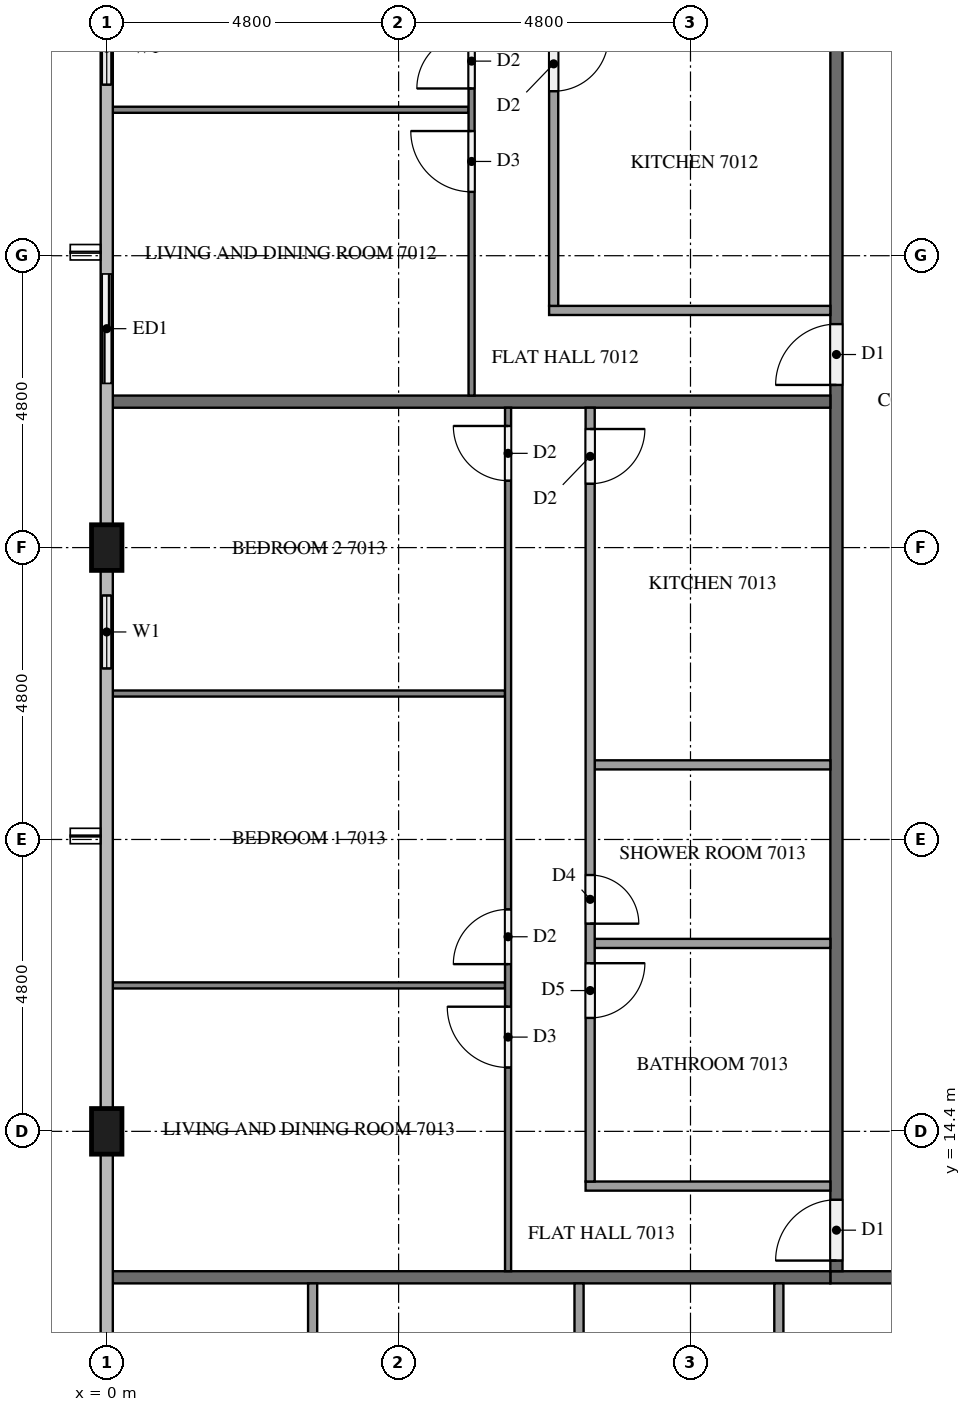
"""IFC4 building model, lengths in metres.
Left out: names, types, materials, properties, quantities, classifications, styles, units other than length and angle.
Written with IfcOpenShell. Run it as: python <this file> out.ifc"""

import sys

from ifc_helpers import new_model, si_unit, direction, frame, frame_2d, origin, origin_2d, place, context, subcontext, project, spatial, rectangle, extrude, element, fill, save


model = new_model("IFC4")
c1 = context("Model", 3, precision=1e-05, world=origin(), true_north=direction((0.0, 1.0)))
c2 = subcontext(c1, "Body", "Model", "MODEL_VIEW")
j1 = project(units=[si_unit("LENGTHUNIT", "METRE"), si_unit("PLANEANGLEUNIT", "RADIAN")], contexts=[c1])
p1 = place(None, origin())
s1 = spatial("IfcSite", under=j1, at=p1, CompositionType="ELEMENT")
p2 = place(p1, origin())
s2 = spatial("IfcBuilding", under=s1, at=p2, CompositionType="ELEMENT")
p3 = place(p2, frame((0.0, 0.0, 268.6)))
s3 = spatial("IfcBuildingStorey", under=s2, at=p3, CompositionType="ELEMENT", Elevation=268.6)
for number, where, z_axis, x_axis in (
    (1, (0.0, 24.0, 0.0), (0.0, 0.0, 1.0), (0.0, 1.0, 0.0)),
    (2, (0.0, 14.4, 0.0), (0.0, 0.0, 1.0), (0.0, 1.0, 0.0)),
):
    element("IfcColumn", number, at=place(p3, frame(where, z_axis=z_axis, x_axis=x_axis)), inside=s3, PredefinedType="COLUMN", context=c2, shape_type="SweptSolid", body=[
        extrude(rectangle(XDim=0.75, YDim=0.5, at=origin_2d()), origin(), (0.0, 0.0, 1.0), 3.2),
    ])
p4 = place(p3, frame((0.0, 33.225, 0.0), z_axis=(0.0, 0.0, 1.0), x_axis=(0.0, -1.0, 0.0)))
e3 = element("IfcWall", 3, at=p4, inside=s3, PredefinedType="SOLIDWALL", context=c2, shape_type="SweptSolid", body=[
    extrude(rectangle(XDim=2.025, YDim=0.15, at=frame_2d((1.013, 0.0))), origin(), (0.0, 0.0, 1.0), 3.2),
])
p5 = place(p4, frame((0.413, 0.0, 0.9)))
e4 = element("IfcOpeningElement", 4, at=p5, cuts=e3, PredefinedType="OPENING", context=c2, shape_type="SweptSolid", body=[
    extrude(rectangle(XDim=1.2, YDim=1.4, at=frame_2d((0.6, 0.7))), frame((0.0, 0.085, 0.0), z_axis=(0.0, -1.0, 0.0), x_axis=(1.0, 0.0, 0.0)), (0.0, 0.0, 1.0), 0.17),
])
p6 = place(p3, frame((0.0, 28.8, 0.0), z_axis=(0.0, 0.0, 1.0), x_axis=(0.0, -1.0, 0.0)))
e5 = element("IfcWall", 5, at=p6, inside=s3, PredefinedType="SOLIDWALL", context=c2, shape_type="SweptSolid", body=[
    extrude(rectangle(XDim=2.4, YDim=0.15, at=frame_2d((1.2, 0.0))), origin(), (0.0, 0.0, 1.0), 3.2),
])
p7 = place(p6, frame((0.3, 0.0, 0.0)))
e6 = element("IfcOpeningElement", 6, at=p7, cuts=e5, PredefinedType="OPENING", context=c2, shape_type="SweptSolid", body=[
    extrude(rectangle(XDim=1.8, YDim=2.4, at=frame_2d((0.9, 1.2))), frame((0.0, 0.085, 0.0), z_axis=(0.0, -1.0, 0.0), x_axis=(1.0, 0.0, 0.0)), (0.0, 0.0, 1.0), 0.17),
])
p8 = place(p3, frame((0.0, 23.625, 0.0), z_axis=(0.0, 0.0, 1.0), x_axis=(0.0, -1.0, 0.0)))
e7 = element("IfcWall", 7, at=p8, inside=s3, PredefinedType="SOLIDWALL", context=c2, shape_type="SweptSolid", body=[
    extrude(rectangle(XDim=2.025, YDim=0.15, at=frame_2d((1.012, 0.0))), origin(), (0.0, 0.0, 1.0), 3.2),
])
p9 = place(p8, frame((0.413, 0.0, 0.9)))
e8 = element("IfcOpeningElement", 8, at=p9, cuts=e7, PredefinedType="OPENING", context=c2, shape_type="SweptSolid", body=[
    extrude(rectangle(XDim=1.2, YDim=1.4, at=frame_2d((0.6, 0.7))), frame((0.0, 0.085, 0.0), z_axis=(0.0, -1.0, 0.0), x_axis=(1.0, 0.0, 0.0)), (0.0, 0.0, 1.0), 0.17),
])
p10 = place(p3, frame((50.5, 12.0, 0.0), z_axis=(0.0, 0.0, 1.0), x_axis=(-1.0, 0.0, 0.0)))
e9 = element("IfcWall", 9, at=p10, inside=s3, PredefinedType="PARTITIONING", context=c2, shape_type="SweptSolid", body=[
    extrude(rectangle(XDim=38.6, YDim=0.2, at=frame_2d((19.3, 0.0))), origin(), (0.0, 0.0, 1.0), 3.2),
])
p11 = place(p10, frame((31.525, 0.0, 0.0)))
e10 = element("IfcOpeningElement", 10, at=p11, cuts=e9, PredefinedType="OPENING", context=c2, shape_type="SweptSolid", body=[
    extrude(rectangle(XDim=1.1, YDim=2.1, at=frame_2d((0.55, 1.05))), frame((0.0, 0.11, 0.0), z_axis=(0.0, -1.0, 0.0), x_axis=(1.0, 0.0, 0.0)), (0.0, 0.0, 1.0), 0.22),
])
p12 = place(p10, frame((19.575, 0.0, 0.0)))
e11 = element("IfcOpeningElement", 11, at=p12, cuts=e9, PredefinedType="OPENING", context=c2, shape_type="SweptSolid", body=[
    extrude(rectangle(XDim=1.0, YDim=2.1, at=frame_2d((0.5, 1.05))), frame((0.0, 0.11, 0.0), z_axis=(0.0, -1.0, 0.0), x_axis=(1.0, 0.0, 0.0)), (0.0, 0.0, 1.0), 0.22),
])
p13 = place(p10, frame((18.025, 0.0, 0.0)))
e12 = element("IfcOpeningElement", 12, at=p13, cuts=e9, PredefinedType="OPENING", context=c2, shape_type="SweptSolid", body=[
    extrude(rectangle(XDim=1.0, YDim=2.1, at=frame_2d((0.5, 1.05))), frame((0.0, 0.11, 0.0), z_axis=(0.0, -1.0, 0.0), x_axis=(1.0, 0.0, 0.0)), (0.0, 0.0, 1.0), 0.22),
])
p14 = place(p10, frame((1.225, 0.0, 0.0)))
e13 = element("IfcOpeningElement", 13, at=p14, cuts=e9, PredefinedType="OPENING", context=c2, shape_type="SweptSolid", body=[
    extrude(rectangle(XDim=1.0, YDim=2.1, at=frame_2d((0.5, 1.05))), frame((0.0, 0.11, 0.0), z_axis=(0.0, -1.0, 0.0), x_axis=(1.0, 0.0, 0.0)), (0.0, 0.0, 1.0), 0.22),
])
p15 = place(p3, frame((12.0, 12.1, 0.0), z_axis=(0.0, 0.0, 1.0), x_axis=(0.0, 1.0, 0.0)))
e14 = element("IfcWall", 14, at=p15, inside=s3, PredefinedType="PARTITIONING", context=c2, shape_type="SweptSolid", body=[
    extrude(rectangle(XDim=28.6, YDim=0.2, at=frame_2d((14.3, 0.0))), origin(), (0.0, 0.0, 1.0), 3.2),
])
p16 = place(p15, frame((24.175, 0.0, 0.0)))
e15 = element("IfcOpeningElement", 15, at=p16, cuts=e14, PredefinedType="OPENING", context=c2, shape_type="SweptSolid", body=[
    extrude(rectangle(XDim=1.0, YDim=2.1, at=frame_2d((0.5, 1.05))), frame((0.0, 0.11, 0.0), z_axis=(0.0, -1.0, 0.0), x_axis=(1.0, 0.0, 0.0)), (0.0, 0.0, 1.0), 0.22),
])
p17 = place(p15, frame((14.575, 0.0, 0.0)))
e16 = element("IfcOpeningElement", 16, at=p17, cuts=e14, PredefinedType="OPENING", context=c2, shape_type="SweptSolid", body=[
    extrude(rectangle(XDim=1.0, YDim=2.1, at=frame_2d((0.5, 1.05))), frame((0.0, 0.11, 0.0), z_axis=(0.0, -1.0, 0.0), x_axis=(1.0, 0.0, 0.0)), (0.0, 0.0, 1.0), 0.22),
])
p18 = place(p15, frame((0.175, 0.0, 0.0)))
e17 = element("IfcOpeningElement", 17, at=p18, cuts=e14, PredefinedType="OPENING", context=c2, shape_type="SweptSolid", body=[
    extrude(rectangle(XDim=1.0, YDim=2.1, at=frame_2d((0.5, 1.05))), frame((0.0, 0.11, 0.0), z_axis=(0.0, -1.0, 0.0), x_axis=(1.0, 0.0, 0.0)), (0.0, 0.0, 1.0), 0.22),
])
for number, where, z_axis, x_axis in (
    (18, (0.1, 12.0, 0.0), (0.0, 0.0, 1.0), (1.0, 0.0, 0.0)),
    (19, (0.1, 26.4, 0.0), (0.0, 0.0, 1.0), (1.0, 0.0, 0.0)),
):
    element("IfcWall", number, at=place(p3, frame(where, z_axis=z_axis, x_axis=x_axis)), inside=s3, PredefinedType="PARTITIONING", context=c2, shape_type="SweptSolid", body=[
        extrude(rectangle(XDim=11.8, YDim=0.2, at=frame_2d((5.9, 0.0))), origin(), (0.0, 0.0, 1.0), 3.2),
    ])
for number, where, z_axis, x_axis in (
    (20, (11.053, 11.9, 0.0), (0.0, 0.0, 1.0), (0.0, -1.0, 0.0)),
    (21, (7.767, 11.9, 0.0), (0.0, 0.0, 1.0), (0.0, -1.0, 0.0)),
    (22, (3.386, 11.9, 0.0), (0.0, 0.0, 1.0), (0.0, -1.0, 0.0)),
):
    element("IfcWall", number, at=place(p3, frame(where, z_axis=z_axis, x_axis=x_axis)), inside=s3, PredefinedType="PARTITIONING", context=c2, shape_type="SweptSolid", body=[
        extrude(rectangle(XDim=2.975, YDim=0.15, at=frame_2d((1.487, 0.0))), origin(), (0.0, 0.0, 1.0), 3.2),
    ])
p19 = place(p3, frame((5.95, 31.2, 0.0), z_axis=(0.0, 0.0, 1.0), x_axis=(-1.0, 0.0, 0.0)))
e23 = element("IfcWall", 23, at=p19, inside=s3, PredefinedType="PARTITIONING", context=c2, shape_type="SweptSolid", body=[
    extrude(rectangle(XDim=5.85, YDim=0.1, at=frame_2d((2.925, 0.0))), origin(), (0.0, 0.0, 1.0), 3.2),
])
p20 = place(p3, frame((6.0, 26.5, 0.0), z_axis=(0.0, 0.0, 1.0), x_axis=(0.0, 1.0, 0.0)))
e24 = element("IfcWall", 24, at=p20, inside=s3, PredefinedType="PARTITIONING", context=c2, shape_type="SweptSolid", body=[
    extrude(rectangle(XDim=9.4, YDim=0.1, at=frame_2d((4.7, 0.0))), origin(), (0.0, 0.0, 1.0), 3.2),
])
p21 = place(p20, frame((3.35, 0.0, 0.0)))
e25 = element("IfcOpeningElement", 25, at=p21, cuts=e24, PredefinedType="OPENING", context=c2, shape_type="SweptSolid", body=[
    extrude(rectangle(XDim=1.0, YDim=2.1, at=frame_2d((0.5, 1.05))), frame((0.0, 0.06, 0.0), z_axis=(0.0, -1.0, 0.0), x_axis=(1.0, 0.0, 0.0)), (0.0, 0.0, 1.0), 0.12),
])
p22 = place(p20, frame((5.05, 0.0, 0.0)))
e26 = element("IfcOpeningElement", 26, at=p22, cuts=e24, PredefinedType="OPENING", context=c2, shape_type="SweptSolid", body=[
    extrude(rectangle(XDim=0.9, YDim=2.1, at=frame_2d((0.45, 1.05))), frame((0.0, 0.06, 0.0), z_axis=(0.0, -1.0, 0.0), x_axis=(1.0, 0.0, 0.0)), (0.0, 0.0, 1.0), 0.12),
])
p23 = place(p3, frame((11.9, 27.9, 0.0), z_axis=(0.0, 0.0, 1.0), x_axis=(-1.0, 0.0, 0.0)))
e27 = element("IfcWall", 27, at=p23, inside=s3, PredefinedType="PARTITIONING", context=c2, shape_type="SweptSolid", body=[
    extrude(rectangle(XDim=4.625, YDim=0.15, at=frame_2d((2.312, 0.0))), origin(), (0.0, 0.0, 1.0), 3.2),
])
p24 = place(p3, frame((7.35, 35.9, 0.0), z_axis=(0.0, 0.0, 1.0), x_axis=(0.0, -1.0, 0.0)))
e28 = element("IfcWall", 28, at=p24, inside=s3, PredefinedType="PARTITIONING", context=c2, shape_type="SweptSolid", body=[
    extrude(rectangle(XDim=7.925, YDim=0.15, at=frame_2d((3.962, 0.0))), origin(), (0.0, 0.0, 1.0), 3.2),
])
p25 = place(p24, frame((3.495, 0.0, 0.0)))
e29 = element("IfcOpeningElement", 29, at=p25, cuts=e28, PredefinedType="OPENING", context=c2, shape_type="SweptSolid", body=[
    extrude(rectangle(XDim=0.9, YDim=2.1, at=frame_2d((0.45, 1.05))), frame((0.0, 0.085, 0.0), z_axis=(0.0, -1.0, 0.0), x_axis=(1.0, 0.0, 0.0)), (0.0, 0.0, 1.0), 0.17),
])
p26 = place(p24, frame((2.045, 0.0, 0.0)))
e30 = element("IfcOpeningElement", 30, at=p26, cuts=e28, PredefinedType="OPENING", context=c2, shape_type="SweptSolid", body=[
    extrude(rectangle(XDim=0.8, YDim=2.1, at=frame_2d((0.4, 1.05))), frame((0.0, 0.085, 0.0), z_axis=(0.0, -1.0, 0.0), x_axis=(1.0, 0.0, 0.0)), (0.0, 0.0, 1.0), 0.17),
])
for number, where, z_axis, x_axis in (
    (31, (6.55, 16.8, 0.0), (0.0, 0.0, 1.0), (-1.0, 0.0, 0.0)),
    (32, (6.55, 21.6, 0.0), (0.0, 0.0, 1.0), (-1.0, 0.0, 0.0)),
):
    element("IfcWall", number, at=place(p3, frame(where, z_axis=z_axis, x_axis=x_axis)), inside=s3, PredefinedType="PARTITIONING", context=c2, shape_type="SweptSolid", body=[
        extrude(rectangle(XDim=6.45, YDim=0.1, at=frame_2d((3.225, 0.0))), origin(), (0.0, 0.0, 1.0), 3.2),
    ])
p27 = place(p3, frame((6.6, 12.1, 0.0), z_axis=(0.0, 0.0, 1.0), x_axis=(0.0, 1.0, 0.0)))
e33 = element("IfcWall", 33, at=p27, inside=s3, PredefinedType="PARTITIONING", context=c2, shape_type="SweptSolid", body=[
    extrude(rectangle(XDim=14.2, YDim=0.1, at=frame_2d((7.1, 0.0))), origin(), (0.0, 0.0, 1.0), 3.2),
])
p28 = place(p27, frame((3.35, 0.0, 0.0)))
e34 = element("IfcOpeningElement", 34, at=p28, cuts=e33, PredefinedType="OPENING", context=c2, shape_type="SweptSolid", body=[
    extrude(rectangle(XDim=1.0, YDim=2.1, at=frame_2d((0.5, 1.05))), frame((0.0, 0.06, 0.0), z_axis=(0.0, -1.0, 0.0), x_axis=(1.0, 0.0, 0.0)), (0.0, 0.0, 1.0), 0.12),
])
p29 = place(p27, frame((5.05, 0.0, 0.0)))
e35 = element("IfcOpeningElement", 35, at=p29, cuts=e33, PredefinedType="OPENING", context=c2, shape_type="SweptSolid", body=[
    extrude(rectangle(XDim=0.9, YDim=2.1, at=frame_2d((0.45, 1.05))), frame((0.0, 0.06, 0.0), z_axis=(0.0, -1.0, 0.0), x_axis=(1.0, 0.0, 0.0)), (0.0, 0.0, 1.0), 0.12),
])
p30 = place(p27, frame((13.0, 0.0, 0.0)))
e36 = element("IfcOpeningElement", 36, at=p30, cuts=e33, PredefinedType="OPENING", context=c2, shape_type="SweptSolid", body=[
    extrude(rectangle(XDim=0.9, YDim=2.1, at=frame_2d((0.45, 1.05))), frame((0.0, 0.06, 0.0), z_axis=(0.0, -1.0, 0.0), x_axis=(1.0, 0.0, 0.0)), (0.0, 0.0, 1.0), 0.12),
])
for number, where, z_axis, x_axis in (
    (37, (11.9, 17.49, 0.0), (0.0, 0.0, 1.0), (-1.0, 0.0, 0.0)),
    (38, (11.9, 20.427, 0.0), (0.0, 0.0, 1.0), (-1.0, 0.0, 0.0)),
):
    element("IfcWall", number, at=place(p3, frame(where, z_axis=z_axis, x_axis=x_axis)), inside=s3, PredefinedType="PARTITIONING", context=c2, shape_type="SweptSolid", body=[
        extrude(rectangle(XDim=3.875, YDim=0.15, at=frame_2d((1.938, 0.0))), origin(), (0.0, 0.0, 1.0), 3.2),
    ])
p31 = place(p3, frame((11.9, 13.5, 0.0), z_axis=(0.0, 0.0, 1.0), x_axis=(-1.0, 0.0, 0.0)))
e39 = element("IfcWall", 39, at=p31, inside=s3, PredefinedType="PARTITIONING", context=c2, shape_type="SweptSolid", body=[
    extrude(rectangle(XDim=4.025, YDim=0.15, at=frame_2d((2.012, 0.0))), origin(), (0.0, 0.0, 1.0), 3.2),
])
p32 = place(p3, frame((7.95, 26.3, 0.0), z_axis=(0.0, 0.0, 1.0), x_axis=(0.0, -1.0, 0.0)))
e40 = element("IfcWall", 40, at=p32, inside=s3, PredefinedType="PARTITIONING", context=c2, shape_type="SweptSolid", body=[
    extrude(rectangle(XDim=12.725, YDim=0.15, at=frame_2d((6.363, 0.0))), origin(), (0.0, 0.0, 1.0), 3.2),
])
p33 = place(p32, frame((9.135, 0.0, 0.0)))
e41 = element("IfcOpeningElement", 41, at=p33, cuts=e40, PredefinedType="OPENING", context=c2, shape_type="SweptSolid", body=[
    extrude(rectangle(XDim=0.9, YDim=2.1, at=frame_2d((0.45, 1.05))), frame((0.0, 0.085, 0.0), z_axis=(0.0, -1.0, 0.0), x_axis=(1.0, 0.0, 0.0)), (0.0, 0.0, 1.0), 0.17),
])
p34 = place(p32, frame((7.685, 0.0, 0.0)))
e42 = element("IfcOpeningElement", 42, at=p34, cuts=e40, PredefinedType="OPENING", context=c2, shape_type="SweptSolid", body=[
    extrude(rectangle(XDim=0.8, YDim=2.1, at=frame_2d((0.4, 1.05))), frame((0.0, 0.085, 0.0), z_axis=(0.0, -1.0, 0.0), x_axis=(1.0, 0.0, 0.0)), (0.0, 0.0, 1.0), 0.17),
])
p35 = place(p32, frame((0.35, 0.0, 0.0)))
e43 = element("IfcOpeningElement", 43, at=p35, cuts=e40, PredefinedType="OPENING", context=c2, shape_type="SweptSolid", body=[
    extrude(rectangle(XDim=0.9, YDim=2.1, at=frame_2d((0.45, 1.05))), frame((0.0, 0.085, 0.0), z_axis=(0.0, -1.0, 0.0), x_axis=(1.0, 0.0, 0.0)), (0.0, 0.0, 1.0), 0.17),
])
p36 = place(p5, origin())
e44 = element("IfcWindow", 44, at=p36, inside=s3, PartitioningType="SINGLE_PANEL", PredefinedType="WINDOW", context=c2, shape_type="SweptSolid", body=[
    extrude(rectangle(XDim=1.2, YDim=1.4, at=frame_2d((0.6, 0.7))), frame((0.0, 0.03, 0.0), z_axis=(0.0, -1.0, 0.0), x_axis=(1.0, 0.0, 0.0)), (0.0, 0.0, 1.0), 0.06),
])
fill(e4, e44)
p37 = place(p7, origin())
e45 = element("IfcDoor", 45, at=p37, inside=s3, OperationType="SLIDING_TO_RIGHT", PredefinedType="DOOR", context=c2, shape_type="SweptSolid", body=[
    extrude(rectangle(XDim=1.8, YDim=2.4, at=frame_2d((0.9, 1.2))), frame((0.0, 0.025, 0.0), z_axis=(0.0, -1.0, 0.0), x_axis=(1.0, 0.0, 0.0)), (0.0, 0.0, 1.0), 0.05),
])
fill(e6, e45)
p38 = place(p9, origin())
e46 = element("IfcWindow", 46, at=p38, inside=s3, PartitioningType="SINGLE_PANEL", PredefinedType="WINDOW", context=c2, shape_type="SweptSolid", body=[
    extrude(rectangle(XDim=1.2, YDim=1.4, at=frame_2d((0.6, 0.7))), frame((0.0, 0.03, 0.0), z_axis=(0.0, -1.0, 0.0), x_axis=(1.0, 0.0, 0.0)), (0.0, 0.0, 1.0), 0.06),
])
fill(e8, e46)
p39 = place(p17, origin())
e47 = element("IfcDoor", 47, at=p39, inside=s3, OperationType="SINGLE_SWING_LEFT", PredefinedType="DOOR", context=c2, shape_type="SweptSolid", body=[
    extrude(rectangle(XDim=1.0, YDim=2.1, at=frame_2d((0.5, 1.05))), frame((0.0, 0.025, 0.0), z_axis=(0.0, -1.0, 0.0), x_axis=(1.0, 0.0, 0.0)), (0.0, 0.0, 1.0), 0.05),
])
fill(e16, e47)
p40 = place(p18, origin())
e48 = element("IfcDoor", 48, at=p40, inside=s3, OperationType="SINGLE_SWING_LEFT", PredefinedType="DOOR", context=c2, shape_type="SweptSolid", body=[
    extrude(rectangle(XDim=1.0, YDim=2.1, at=frame_2d((0.5, 1.05))), frame((0.0, 0.025, 0.0), z_axis=(0.0, -1.0, 0.0), x_axis=(1.0, 0.0, 0.0)), (0.0, 0.0, 1.0), 0.05),
])
fill(e17, e48)
p41 = place(p21, origin())
e49 = element("IfcDoor", 49, at=p41, inside=s3, OperationType="SINGLE_SWING_RIGHT", PredefinedType="DOOR", context=c2, shape_type="SweptSolid", body=[
    extrude(rectangle(XDim=1.0, YDim=2.1, at=frame_2d((0.5, 1.05))), frame((0.0, 0.025, 0.0), z_axis=(0.0, -1.0, 0.0), x_axis=(1.0, 0.0, 0.0)), (0.0, 0.0, 1.0), 0.05),
])
fill(e25, e49)
p42 = place(p22, origin())
e50 = element("IfcDoor", 50, at=p42, inside=s3, OperationType="SINGLE_SWING_LEFT", PredefinedType="DOOR", context=c2, shape_type="SweptSolid", body=[
    extrude(rectangle(XDim=0.9, YDim=2.1, at=frame_2d((0.45, 1.05))), frame((0.0, 0.025, 0.0), z_axis=(0.0, -1.0, 0.0), x_axis=(1.0, 0.0, 0.0)), (0.0, 0.0, 1.0), 0.05),
])
fill(e26, e50)
p43 = place(p25, origin())
e51 = element("IfcDoor", 51, at=p43, inside=s3, OperationType="SINGLE_SWING_LEFT", PredefinedType="DOOR", context=c2, shape_type="SweptSolid", body=[
    extrude(rectangle(XDim=0.9, YDim=2.1, at=frame_2d((0.45, 1.05))), frame((0.0, 0.025, 0.0), z_axis=(0.0, -1.0, 0.0), x_axis=(1.0, 0.0, 0.0)), (0.0, 0.0, 1.0), 0.05),
])
fill(e29, e51)
p44 = place(p28, origin())
e52 = element("IfcDoor", 52, at=p44, inside=s3, OperationType="SINGLE_SWING_RIGHT", PredefinedType="DOOR", context=c2, shape_type="SweptSolid", body=[
    extrude(rectangle(XDim=1.0, YDim=2.1, at=frame_2d((0.5, 1.05))), frame((0.0, 0.025, 0.0), z_axis=(0.0, -1.0, 0.0), x_axis=(1.0, 0.0, 0.0)), (0.0, 0.0, 1.0), 0.05),
])
fill(e34, e52)
p45 = place(p29, origin())
e53 = element("IfcDoor", 53, at=p45, inside=s3, OperationType="SINGLE_SWING_LEFT", PredefinedType="DOOR", context=c2, shape_type="SweptSolid", body=[
    extrude(rectangle(XDim=0.9, YDim=2.1, at=frame_2d((0.45, 1.05))), frame((0.0, 0.025, 0.0), z_axis=(0.0, -1.0, 0.0), x_axis=(1.0, 0.0, 0.0)), (0.0, 0.0, 1.0), 0.05),
])
fill(e35, e53)
p46 = place(p30, origin())
e54 = element("IfcDoor", 54, at=p46, inside=s3, OperationType="SINGLE_SWING_RIGHT", PredefinedType="DOOR", context=c2, shape_type="SweptSolid", body=[
    extrude(rectangle(XDim=0.9, YDim=2.1, at=frame_2d((0.45, 1.05))), frame((0.0, 0.025, 0.0), z_axis=(0.0, -1.0, 0.0), x_axis=(1.0, 0.0, 0.0)), (0.0, 0.0, 1.0), 0.05),
])
fill(e36, e54)
p47 = place(p33, origin())
e55 = element("IfcDoor", 55, at=p47, inside=s3, OperationType="SINGLE_SWING_LEFT", PredefinedType="DOOR", context=c2, shape_type="SweptSolid", body=[
    extrude(rectangle(XDim=0.9, YDim=2.1, at=frame_2d((0.45, 1.05))), frame((0.0, 0.025, 0.0), z_axis=(0.0, -1.0, 0.0), x_axis=(1.0, 0.0, 0.0)), (0.0, 0.0, 1.0), 0.05),
])
fill(e41, e55)
p48 = place(p34, origin())
e56 = element("IfcDoor", 56, at=p48, inside=s3, OperationType="SINGLE_SWING_RIGHT", PredefinedType="DOOR", context=c2, shape_type="SweptSolid", body=[
    extrude(rectangle(XDim=0.8, YDim=2.1, at=frame_2d((0.4, 1.05))), frame((0.0, 0.025, 0.0), z_axis=(0.0, -1.0, 0.0), x_axis=(1.0, 0.0, 0.0)), (0.0, 0.0, 1.0), 0.05),
])
fill(e42, e56)
p49 = place(p35, origin())
e57 = element("IfcDoor", 57, at=p49, inside=s3, OperationType="SINGLE_SWING_LEFT", PredefinedType="DOOR", context=c2, shape_type="SweptSolid", body=[
    extrude(rectangle(XDim=0.9, YDim=2.1, at=frame_2d((0.45, 1.05))), frame((0.0, 0.025, 0.0), z_axis=(0.0, -1.0, 0.0), x_axis=(1.0, 0.0, 0.0)), (0.0, 0.0, 1.0), 0.05),
])
fill(e43, e57)
save(model, sys.argv[1])
